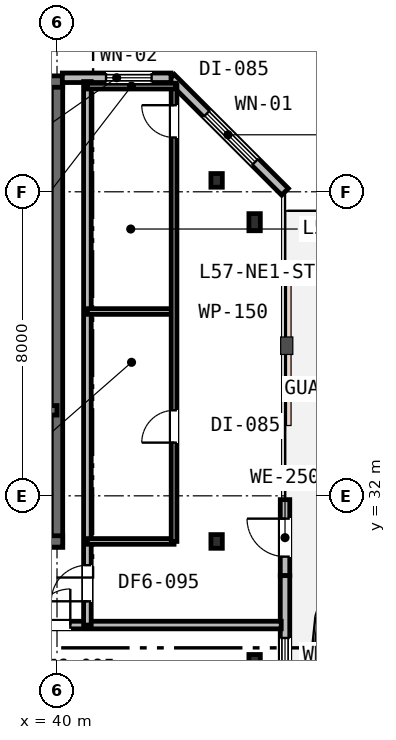
"""IFC4 building model, lengths in metres.
Left out: names, types, materials, properties, quantities, classifications, styles, units other than length and angle.
Written with IfcOpenShell. Run it as: python <this file> out.ifc"""

import sys

from ifc_helpers import new_model, si_unit, direction, frame, frame_2d, origin, origin_2d, place, context, subcontext, project, spatial, rectangle, i_section, extrude, element, fill, save


model = new_model("IFC4")
c1 = context("Model", 3, precision=1e-05, world=origin(), true_north=direction((0.0, 1.0)))
c2 = subcontext(c1, "Body", "Model", "MODEL_VIEW")
j1 = project(units=[si_unit("LENGTHUNIT", "METRE"), si_unit("PLANEANGLEUNIT", "RADIAN")], contexts=[c1])
p1 = place(None, origin())
s1 = spatial("IfcSite", under=j1, at=p1, CompositionType="ELEMENT")
p2 = place(p1, origin())
s2 = spatial("IfcBuilding", under=s1, at=p2, CompositionType="ELEMENT")
p3 = place(p2, frame((0.0, 0.0, 222.2)))
s3 = spatial("IfcBuildingStorey", under=s2, at=p3, CompositionType="ELEMENT", Elevation=222.2)
p4 = place(p3, frame((40.0, 30.65, 0.0), z_axis=(0.0, 0.0, 1.0), x_axis=(0.0, 1.0, 0.0)))
e1 = element("IfcWall", 1, at=p4, inside=s3, PredefinedType="SHEAR", context=c2, shape_type="SweptSolid", body=[
    extrude(rectangle(XDim=12.3, YDim=0.3, at=frame_2d((6.15, 0.0))), origin(), (0.0, 0.0, 1.0), 3.8),
])
p5 = place(p3, frame((15.85, 42.9, 0.0), z_axis=(0.0, 0.0, 1.0), x_axis=(1.0, 0.0, 0.0)))
e2 = element("IfcWall", 2, at=p5, inside=s3, PredefinedType="SHEAR", context=c2, shape_type="SweptSolid", body=[
    extrude(rectangle(XDim=24.3, YDim=0.3, at=frame_2d((12.15, 0.0))), origin(), (0.0, 0.0, 1.0), 3.8),
])
p6 = place(p5, frame((1.6, 0.0, 0.95)))
e3 = element("IfcOpeningElement", 3, at=p6, cuts=e2, PredefinedType="OPENING", context=c2, shape_type="SweptSolid", body=[
    extrude(rectangle(XDim=1.2, YDim=1.6, at=frame_2d((0.6, 0.8))), frame((0.0, 0.16, 0.0), z_axis=(0.0, -1.0, 0.0), x_axis=(1.0, 0.0, 0.0)), (0.0, 0.0, 1.0), 0.32),
])
p7 = place(p5, frame((16.5, 0.0, 0.95)))
e4 = element("IfcOpeningElement", 4, at=p7, cuts=e2, PredefinedType="OPENING", context=c2, shape_type="SweptSolid", body=[
    extrude(rectangle(XDim=1.2, YDim=1.6, at=frame_2d((0.6, 0.8))), frame((0.0, 0.16, 0.0), z_axis=(0.0, -1.0, 0.0), x_axis=(1.0, 0.0, 0.0)), (0.0, 0.0, 1.0), 0.32),
])
p8 = place(p5, frame((21.6, 0.0, 0.95)))
e5 = element("IfcOpeningElement", 5, at=p8, cuts=e2, PredefinedType="OPENING", context=c2, shape_type="SweptSolid", body=[
    extrude(rectangle(XDim=1.2, YDim=1.6, at=frame_2d((0.6, 0.8))), frame((0.0, 0.16, 0.0), z_axis=(0.0, -1.0, 0.0), x_axis=(1.0, 0.0, 0.0)), (0.0, 0.0, 1.0), 0.32),
])
p9 = place(p3, frame((28.95, 30.8, 0.0), z_axis=(0.0, 0.0, 1.0), x_axis=(1.0, 0.0, 0.0)))
e6 = element("IfcWall", 6, at=p9, inside=s3, PredefinedType="SHEAR", context=c2, shape_type="SweptSolid", body=[
    extrude(rectangle(XDim=11.2, YDim=0.3, at=frame_2d((5.6, 0.0))), origin(), (0.0, 0.0, 1.0), 3.8),
])
p10 = place(p9, frame((7.65, 0.0, 0.0)))
e7 = element("IfcOpeningElement", 7, at=p10, cuts=e6, PredefinedType="OPENING", context=c2, shape_type="SweptSolid", body=[
    extrude(rectangle(XDim=1.1, YDim=2.15, at=frame_2d((0.55, 1.075))), frame((0.0, 0.16, 0.0), z_axis=(0.0, -1.0, 0.0), x_axis=(1.0, 0.0, 0.0)), (0.0, 0.0, 1.0), 0.32),
])
p11 = place(p3, frame((33.95, 34.25, 0.0), z_axis=(0.0, 0.0, 1.0), x_axis=(1.0, 0.0, 0.0)))
e8 = element("IfcWall", 8, at=p11, inside=s3, PredefinedType="SHEAR", context=c2, shape_type="SweptSolid", body=[
    extrude(rectangle(XDim=6.05, YDim=0.25, at=frame_2d((3.025, 0.0))), origin(), (0.0, 0.0, 1.0), 3.8),
])
p12 = place(p11, frame((3.7, 0.0, 0.0)))
e9 = element("IfcOpeningElement", 9, at=p12, cuts=e8, PredefinedType="OPENING", context=c2, shape_type="SweptSolid", body=[
    extrude(rectangle(XDim=1.0, YDim=2.15, at=frame_2d((0.5, 1.075))), frame((0.0, 0.135, 0.0), z_axis=(0.0, -1.0, 0.0), x_axis=(1.0, 0.0, 0.0)), (0.0, 0.0, 1.0), 0.27),
])
p13 = place(p11, frame((0.55, 0.0, 0.0)))
e10 = element("IfcOpeningElement", 10, at=p13, cuts=e8, PredefinedType="OPENING", context=c2, shape_type="SweptSolid", body=[
    extrude(rectangle(XDim=1.1, YDim=2.15, at=frame_2d((0.55, 1.075))), frame((0.0, 0.135, 0.0), z_axis=(0.0, -1.0, 0.0), x_axis=(1.0, 0.0, 0.0)), (0.0, 0.0, 1.0), 0.27),
])
for number, where, z_axis, x_axis in (
    (11, (45.2, 27.6, 0.0), (0.0, 0.0, 1.0), (1.0, 0.0, 0.0)),
    (12, (45.2, 39.2, 0.0), (0.0, 0.0, 1.0), (1.0, 0.0, 0.0)),
):
    element("IfcColumn", number, at=place(p3, frame(where, z_axis=z_axis, x_axis=x_axis)), inside=s3, PredefinedType="COLUMN", context=c2, shape_type="SweptSolid", body=[
        extrude(i_section(OverallWidth=0.3, OverallDepth=0.45, WebThickness=0.014, FlangeThickness=0.026, FilletRadius=0.027, at=origin_2d()), origin(), (0.0, 0.0, 1.0), 3.8),
    ])
for number, where, z_axis, x_axis in (
    (13, (44.2, 30.8, 0.0), (0.0, 0.0, 1.0), (1.0, 0.0, 0.0)),
    (14, (44.2, 40.3, 0.0), (0.0, 0.0, 1.0), (1.0, 0.0, 0.0)),
):
    element("IfcColumn", number, at=place(p3, frame(where, z_axis=z_axis, x_axis=x_axis)), inside=s3, PredefinedType="COLUMN", context=c2, shape_type="SweptSolid", body=[
        extrude(i_section(OverallWidth=0.3, OverallDepth=0.36, WebThickness=0.013, FlangeThickness=0.022, FilletRadius=0.027, at=origin_2d()), origin(), (0.0, 0.0, 1.0), 3.8),
    ])
p14 = place(p3, frame((46.0, 29.9, 0.0), z_axis=(0.0, 0.0, 1.0), x_axis=(0.0, 1.0, 0.0)))
e15 = element("IfcWall", 15, at=p14, inside=s3, PredefinedType="STANDARD", context=c2, shape_type="SweptSolid", body=[
    extrude(rectangle(XDim=2.0, YDim=0.25, at=frame_2d((1.0, 0.0))), origin(), (0.0, 0.0, 1.0), 3.53),
])
p15 = place(p14, frame((0.5, 0.0, 0.0)))
e16 = element("IfcOpeningElement", 16, at=p15, cuts=e15, PredefinedType="OPENING", context=c2, shape_type="SweptSolid", body=[
    extrude(rectangle(XDim=1.0, YDim=2.15, at=frame_2d((0.5, 1.075))), frame((0.0, 0.135, 0.0), z_axis=(0.0, -1.0, 0.0), x_axis=(1.0, 0.0, 0.0)), (0.0, 0.0, 1.0), 0.27),
])
p16 = place(p3, frame((46.0, 27.0, 0.0), z_axis=(0.0, 0.0, 1.0), x_axis=(0.0, 1.0, 0.0)))
e17 = element("IfcWall", 17, at=p16, inside=s3, PredefinedType="STANDARD", context=c2, shape_type="SweptSolid", body=[
    extrude(rectangle(XDim=2.9, YDim=0.25, at=frame_2d((1.45, 0.0))), origin(), (0.0, 0.0, 1.0), 3.53),
])
p17 = place(p16, frame((0.36, 0.0, 0.9)))
e18 = element("IfcOpeningElement", 18, at=p17, cuts=e17, PredefinedType="OPENING", context=c2, shape_type="SweptSolid", body=[
    extrude(rectangle(XDim=0.9, YDim=1.55, at=frame_2d((0.45, 0.775))), frame((0.0, 0.135, 0.0), z_axis=(0.0, -1.0, 0.0), x_axis=(1.0, 0.0, 0.0)), (0.0, 0.0, 1.0), 0.27),
])
p18 = place(p3, frame((46.0, 40.0, 0.0), z_axis=(0.0, 0.0, 1.0), x_axis=(-0.707106781187, 0.707106781187, 0.0)))
e19 = element("IfcWall", 19, at=p18, inside=s3, PredefinedType="STANDARD", context=c2, shape_type="SweptSolid", body=[
    extrude(rectangle(XDim=4.243, YDim=0.25, at=frame_2d((2.121, 0.0))), origin(), (0.0, 0.0, 1.0), 3.53),
])
p19 = place(p18, frame((1.111, 0.0, 0.75)))
e20 = element("IfcOpeningElement", 20, at=p19, cuts=e19, PredefinedType="OPENING", context=c2, shape_type="SweptSolid", body=[
    extrude(rectangle(XDim=1.8, YDim=1.85, at=frame_2d((0.9, 0.925))), frame((0.0, 0.135, 0.0), z_axis=(0.0, -1.0, 0.0), x_axis=(1.0, 0.0, 0.0)), (0.0, 0.0, 1.0), 0.27),
])
p20 = place(p3, frame((43.0, 43.0, 0.0), z_axis=(0.0, 0.0, 1.0), x_axis=(-1.0, 0.0, 0.0)))
e21 = element("IfcWall", 21, at=p20, inside=s3, PredefinedType="STANDARD", context=c2, shape_type="SweptSolid", body=[
    extrude(rectangle(XDim=2.86, YDim=0.25, at=frame_2d((1.43, 0.0))), origin(), (0.0, 0.0, 1.0), 3.53),
])
p21 = place(p20, frame((0.51, 0.0, 0.85)))
e22 = element("IfcOpeningElement", 22, at=p21, cuts=e21, PredefinedType="OPENING", context=c2, shape_type="SweptSolid", body=[
    extrude(rectangle(XDim=1.2, YDim=1.6, at=frame_2d((0.6, 0.8))), frame((0.0, 0.135, 0.0), z_axis=(0.0, -1.0, 0.0), x_axis=(1.0, 0.0, 0.0)), (0.0, 0.0, 1.0), 0.27),
])
p22 = place(p3, frame((13.6, 28.6, 0.0), z_axis=(0.0, 0.0, 1.0), x_axis=(1.0, 0.0, 0.0)))
e23 = element("IfcWall", 23, at=p22, inside=s3, PredefinedType="PARTITIONING", context=c2, shape_type="SweptSolid", body=[
    extrude(rectangle(XDim=32.3, YDim=0.2, at=frame_2d((16.15, 0.0))), origin(), (0.0, 0.0, 1.0), 2.92),
])
p23 = place(p22, frame((11.787, 0.0, 0.0)))
e24 = element("IfcOpeningElement", 24, at=p23, cuts=e23, PredefinedType="OPENING", context=c2, shape_type="SweptSolid", body=[
    extrude(rectangle(XDim=0.95, YDim=2.15, at=frame_2d((0.475, 1.075))), frame((0.0, 0.11, 0.0), z_axis=(0.0, -1.0, 0.0), x_axis=(1.0, 0.0, 0.0)), (0.0, 0.0, 1.0), 0.22),
])
p24 = place(p22, frame((25.8, 0.0, 0.0)))
e25 = element("IfcOpeningElement", 25, at=p24, cuts=e23, PredefinedType="OPENING", context=c2, shape_type="SweptSolid", body=[
    extrude(rectangle(XDim=0.95, YDim=2.15, at=frame_2d((0.475, 1.075))), frame((0.0, 0.11, 0.0), z_axis=(0.0, -1.0, 0.0), x_axis=(1.0, 0.0, 0.0)), (0.0, 0.0, 1.0), 0.22),
])
p25 = place(p3, frame((40.8, 28.6, 0.0), z_axis=(0.0, 0.0, 1.0), x_axis=(0.0, 1.0, 0.0)))
e26 = element("IfcWall", 26, at=p25, inside=s3, PredefinedType="PARTITIONING", context=c2, shape_type="SweptSolid", body=[
    extrude(rectangle(XDim=14.3, YDim=0.2, at=frame_2d((7.15, 0.0))), origin(), (0.0, 0.0, 1.0), 2.92),
])
p26 = place(p25, frame((0.625, 0.0, 0.0)))
e27 = element("IfcOpeningElement", 27, at=p26, cuts=e26, PredefinedType="OPENING", context=c2, shape_type="SweptSolid", body=[
    extrude(rectangle(XDim=0.95, YDim=2.15, at=frame_2d((0.475, 1.075))), frame((0.0, 0.11, 0.0), z_axis=(0.0, -1.0, 0.0), x_axis=(1.0, 0.0, 0.0)), (0.0, 0.0, 1.0), 0.22),
])
p27 = place(p3, frame((40.8, 30.8, 0.0), z_axis=(0.0, 0.0, 1.0), x_axis=(1.0, 0.0, 0.0)))
e28 = element("IfcWall", 28, at=p27, inside=s3, PredefinedType="PARTITIONING", context=c2, shape_type="SweptSolid", body=[
    extrude(rectangle(XDim=2.28, YDim=0.15, at=frame_2d((1.14, 0.0))), origin(), (0.0, 0.0, 1.0), 2.92),
])
p28 = place(p3, frame((40.8, 36.85, 0.0), z_axis=(0.0, 0.0, 1.0), x_axis=(1.0, 0.0, 0.0)))
e29 = element("IfcWall", 29, at=p28, inside=s3, PredefinedType="PARTITIONING", context=c2, shape_type="SweptSolid", body=[
    extrude(rectangle(XDim=2.28, YDim=0.15, at=frame_2d((1.14, 0.0))), origin(), (0.0, 0.0, 1.0), 3.53),
])
p29 = place(p3, frame((43.08, 30.8, 0.0), z_axis=(0.0, 0.0, 1.0), x_axis=(0.0, 1.0, 0.0)))
e30 = element("IfcWall", 30, at=p29, inside=s3, PredefinedType="PARTITIONING", context=c2, shape_type="SweptSolid", body=[
    extrude(rectangle(XDim=12.02, YDim=0.15, at=frame_2d((6.01, 0.0))), origin(), (0.0, 0.0, 1.0), 2.92),
])
p30 = place(p29, frame((2.6, 0.0, 0.0)))
e31 = element("IfcOpeningElement", 31, at=p30, cuts=e30, PredefinedType="OPENING", context=c2, shape_type="SweptSolid", body=[
    extrude(rectangle(XDim=0.85, YDim=2.15, at=frame_2d((0.425, 1.075))), frame((0.0, 0.085, 0.0), z_axis=(0.0, -1.0, 0.0), x_axis=(1.0, 0.0, 0.0)), (0.0, 0.0, 1.0), 0.17),
])
p31 = place(p29, frame((10.629, 0.0, 0.0)))
e32 = element("IfcOpeningElement", 32, at=p31, cuts=e30, PredefinedType="OPENING", context=c2, shape_type="SweptSolid", body=[
    extrude(rectangle(XDim=0.85, YDim=2.15, at=frame_2d((0.425, 1.075))), frame((0.0, 0.085, 0.0), z_axis=(0.0, -1.0, 0.0), x_axis=(1.0, 0.0, 0.0)), (0.0, 0.0, 1.0), 0.17),
])
p32 = place(p3, frame((40.8, 42.78, 0.0), z_axis=(0.0, 0.0, 1.0), x_axis=(1.0, 0.0, 0.0)))
e33 = element("IfcWall", 33, at=p32, inside=s3, PredefinedType="PARTITIONING", context=c2, shape_type="SweptSolid", body=[
    extrude(rectangle(XDim=2.32, YDim=0.15, at=frame_2d((1.16, 0.0))), origin(), (0.0, 0.0, 1.0), 3.53),
])
p33 = place(p15, origin())
e34 = element("IfcDoor", 34, at=p33, inside=s3, OperationType="SINGLE_SWING_RIGHT", PredefinedType="DOOR", context=c2, shape_type="SweptSolid", body=[
    extrude(rectangle(XDim=1.0, YDim=2.15, at=frame_2d((0.5, 1.075))), frame((0.0, 0.025, 0.0), z_axis=(0.0, -1.0, 0.0), x_axis=(1.0, 0.0, 0.0)), (0.0, 0.0, 1.0), 0.05),
])
fill(e16, e34)
p34 = place(p17, origin())
e35 = element("IfcWindow", 35, at=p34, inside=s3, PartitioningType="SINGLE_PANEL", PredefinedType="WINDOW", context=c2, shape_type="SweptSolid", body=[
    extrude(rectangle(XDim=0.9, YDim=1.55, at=frame_2d((0.45, 0.775))), frame((0.0, 0.03, 0.0), z_axis=(0.0, -1.0, 0.0), x_axis=(1.0, 0.0, 0.0)), (0.0, 0.0, 1.0), 0.06),
])
fill(e18, e35)
p35 = place(p19, origin())
e36 = element("IfcWindow", 36, at=p35, inside=s3, PartitioningType="SINGLE_PANEL", PredefinedType="WINDOW", context=c2, shape_type="SweptSolid", body=[
    extrude(rectangle(XDim=1.8, YDim=1.85, at=frame_2d((0.9, 0.925))), frame((0.0, 0.03, 0.0), z_axis=(0.0, -1.0, 0.0), x_axis=(1.0, 0.0, 0.0)), (0.0, 0.0, 1.0), 0.06),
])
fill(e20, e36)
p36 = place(p21, origin())
e37 = element("IfcWindow", 37, at=p36, inside=s3, PartitioningType="SINGLE_PANEL", PredefinedType="WINDOW", context=c2, shape_type="SweptSolid", body=[
    extrude(rectangle(XDim=1.2, YDim=1.6, at=frame_2d((0.6, 0.8))), frame((0.0, 0.03, 0.0), z_axis=(0.0, -1.0, 0.0), x_axis=(1.0, 0.0, 0.0)), (0.0, 0.0, 1.0), 0.06),
])
fill(e22, e37)
p37 = place(p26, origin())
e38 = element("IfcDoor", 38, at=p37, inside=s3, OperationType="SINGLE_SWING_LEFT", PredefinedType="DOOR", context=c2, shape_type="SweptSolid", body=[
    extrude(rectangle(XDim=0.95, YDim=2.15, at=frame_2d((0.475, 1.075))), frame((0.0, 0.025, 0.0), z_axis=(0.0, -1.0, 0.0), x_axis=(1.0, 0.0, 0.0)), (0.0, 0.0, 1.0), 0.05),
])
fill(e27, e38)
p38 = place(p30, origin())
e39 = element("IfcDoor", 39, at=p38, inside=s3, OperationType="SINGLE_SWING_LEFT", PredefinedType="DOOR", context=c2, shape_type="SweptSolid", body=[
    extrude(rectangle(XDim=0.85, YDim=2.15, at=frame_2d((0.425, 1.075))), frame((0.0, 0.025, 0.0), z_axis=(0.0, -1.0, 0.0), x_axis=(1.0, 0.0, 0.0)), (0.0, 0.0, 1.0), 0.05),
])
fill(e31, e39)
p39 = place(p31, origin())
e40 = element("IfcDoor", 40, at=p39, inside=s3, OperationType="SINGLE_SWING_RIGHT", PredefinedType="DOOR", context=c2, shape_type="SweptSolid", body=[
    extrude(rectangle(XDim=0.85, YDim=2.15, at=frame_2d((0.425, 1.075))), frame((0.0, 0.025, 0.0), z_axis=(0.0, -1.0, 0.0), x_axis=(1.0, 0.0, 0.0)), (0.0, 0.0, 1.0), 0.05),
])
fill(e32, e40)
p40 = place(p24, origin())
e41 = element("IfcDoor", 41, at=p40, inside=s3, OperationType="SINGLE_SWING_RIGHT", PredefinedType="DOOR", context=c2, shape_type="SweptSolid", body=[
    extrude(rectangle(XDim=0.95, YDim=2.15, at=frame_2d((0.475, 1.075))), frame((0.0, 0.025, 0.0), z_axis=(0.0, -1.0, 0.0), x_axis=(1.0, 0.0, 0.0)), (0.0, 0.0, 1.0), 0.05),
])
fill(e25, e41)
save(model, sys.argv[1])
